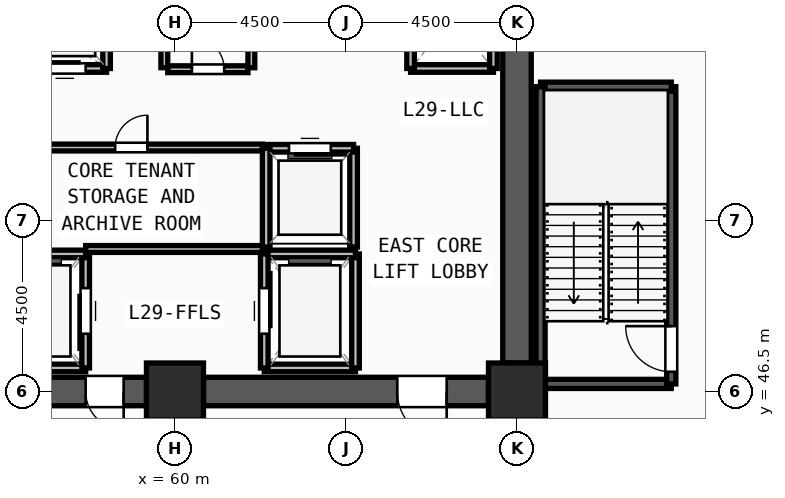
"""IFC4 building model, lengths in metres.
Left out: names, types, materials, properties, quantities, classifications, styles, units other than length and angle.
Written with IfcOpenShell. Run it as: python <this file> out.ifc"""

import sys

from ifc_helpers import new_model, si_unit, direction, frame, frame_2d, origin, origin_2d, place, context, subcontext, project, spatial, rectangle, extrude, source, transform, mapped, element, fill, save


model = new_model("IFC4")
c1 = context("Model", 3, precision=1e-05, world=origin(), true_north=direction((0.0, 1.0)))
c2 = subcontext(c1, "Body", "Model", "MODEL_VIEW")
j1 = project(units=[si_unit("LENGTHUNIT", "METRE"), si_unit("PLANEANGLEUNIT", "RADIAN")], contexts=[c1])
p1 = place(None, origin())
s1 = spatial("IfcSite", under=j1, at=p1, CompositionType="ELEMENT")
p2 = place(p1, origin())
s2 = spatial("IfcBuilding", under=s1, at=p2, CompositionType="ELEMENT")
p3 = place(p2, frame((0.0, 0.0, 113.25)))
s3 = spatial("IfcBuildingStorey", under=s2, at=p3, CompositionType="ELEMENT", Elevation=113.25)
m1 = source(origin(), c2, "Body", "SweptSolid", [
    extrude(rectangle(XDim=1.5, YDim=1.5, at=origin_2d()), origin(), (0.0, 0.0, 1.0), 3.75),
])
for number, where, z_axis, x_axis in (
    (1, (60.0, 46.5, 0.0), (0.0, 0.0, 1.0), (1.0, 0.0, 0.0)),
    (2, (69.0, 46.5, 0.0), (0.0, 0.0, 1.0), (1.0, 0.0, 0.0)),
):
    element("IfcColumn", number, at=place(p3, frame(where, z_axis=z_axis, x_axis=x_axis)), inside=s3, PredefinedType="COLUMN", context=c2, shape_type="MappedRepresentation", body=[
        mapped(m1, transform((0.0, 0.0, 0.0), x_axis=(1.0, 0.0, 0.0), y_axis=(0.0, 1.0, 0.0), z_axis=(0.0, 0.0, 1.0), scale=1.0)),
    ])
p4 = place(p3, frame((69.0, 60.75, 0.0), z_axis=(0.0, 0.0, 1.0), x_axis=(0.0, -1.0, 0.0)))
e3 = element("IfcWall", 3, at=p4, inside=s3, PredefinedType="SHEAR", context=c2, shape_type="SweptSolid", body=[
    extrude(rectangle(XDim=13.5, YDim=0.75, at=frame_2d((6.75, 0.0))), origin(), (0.0, 0.0, 1.0), 3.57),
])
m2 = source(origin(), c2, "Body", "SweptSolid", [
    extrude(rectangle(XDim=1.2, YDim=2.2, at=frame_2d((0.6, 1.1))), frame((0.0, 0.385, 0.0), z_axis=(0.0, -1.0, 0.0), x_axis=(1.0, 0.0, 0.0)), (0.0, 0.0, 1.0), 0.77),
])
p5 = place(p4, frame((1.2, 0.0, 0.0)))
e4 = element("IfcOpeningElement", 4, at=p5, cuts=e3, PredefinedType="OPENING", context=c2, shape_type="MappedRepresentation", body=[
    mapped(m2, transform((0.0, 0.0, 0.0), x_axis=(1.0, 0.0, 0.0), y_axis=(0.0, 1.0, 0.0), z_axis=(0.0, 0.0, 1.0), scale=1.0)),
])
p6 = place(p3, frame((68.25, 46.5, 0.0), z_axis=(0.0, 0.0, 1.0), x_axis=(-1.0, 0.0, 0.0)))
e5 = element("IfcWall", 5, at=p6, inside=s3, PredefinedType="SHEAR", context=c2, shape_type="SweptSolid", body=[
    extrude(rectangle(XDim=7.5, YDim=0.75, at=frame_2d((3.75, 0.0))), origin(), (0.0, 0.0, 1.0), 3.57),
])
m3 = source(origin(), c2, "Body", "SweptSolid", [
    extrude(rectangle(XDim=1.3, YDim=2.2, at=frame_2d((0.65, 1.1))), frame((0.0, 0.385, 0.0), z_axis=(0.0, -1.0, 0.0), x_axis=(1.0, 0.0, 0.0)), (0.0, 0.0, 1.0), 0.77),
])
p7 = place(p6, frame((1.1, 0.0, 0.0)))
e6 = element("IfcOpeningElement", 6, at=p7, cuts=e5, PredefinedType="OPENING", context=c2, shape_type="MappedRepresentation", body=[
    mapped(m3, transform((0.0, 0.0, 0.0), x_axis=(1.0, 0.0, 0.0), y_axis=(0.0, 1.0, 0.0), z_axis=(0.0, 0.0, 1.0), scale=1.0)),
])
p8 = place(p3, frame((59.25, 46.5, 0.0), z_axis=(0.0, 0.0, 1.0), x_axis=(-1.0, 0.0, 0.0)))
e7 = element("IfcWall", 7, at=p8, inside=s3, PredefinedType="SHEAR", context=c2, shape_type="SweptSolid", body=[
    extrude(rectangle(XDim=7.5, YDim=0.75, at=frame_2d((3.75, 0.0))), origin(), (0.0, 0.0, 1.0), 3.57),
])
p9 = place(p8, frame((5.1, 0.0, 0.0)))
e8 = element("IfcOpeningElement", 8, at=p9, cuts=e7, PredefinedType="OPENING", context=c2, shape_type="MappedRepresentation", body=[
    mapped(m3, transform((0.0, 0.0, 0.0), x_axis=(1.0, 0.0, 0.0), y_axis=(0.0, 1.0, 0.0), z_axis=(0.0, 0.0, 1.0), scale=1.0)),
])
m4 = source(origin(), c2, "Body", "SweptSolid", [
    extrude(rectangle(XDim=1.0, YDim=2.2, at=frame_2d((0.5, 1.1))), frame((0.0, 0.385, 0.0), z_axis=(0.0, -1.0, 0.0), x_axis=(1.0, 0.0, 0.0)), (0.0, 0.0, 1.0), 0.77),
])
p10 = place(p8, frame((0.6, 0.0, 0.0)))
e9 = element("IfcOpeningElement", 9, at=p10, cuts=e7, PredefinedType="OPENING", context=c2, shape_type="MappedRepresentation", body=[
    mapped(m4, transform((0.0, 0.0, 0.0), x_axis=(1.0, 0.0, 0.0), y_axis=(0.0, 1.0, 0.0), z_axis=(0.0, 0.0, 1.0), scale=1.0)),
])
p11 = place(p3, frame((69.62, 46.7, 0.0), z_axis=(0.0, 0.0, 1.0), x_axis=(1.0, 0.0, 0.0)))
e10 = element("IfcWall", 10, at=p11, inside=s3, PredefinedType="SOLIDWALL", context=c2, shape_type="SweptSolid", body=[
    extrude(rectangle(XDim=3.44, YDim=0.24, at=frame_2d((1.72, 0.0))), origin(), (0.0, 0.0, 1.0), 3.57),
])
p12 = place(p3, frame((73.06, 46.7, 0.0), z_axis=(0.0, 0.0, 1.0), x_axis=(0.0, 1.0, 0.0)))
e11 = element("IfcWall", 11, at=p12, inside=s3, PredefinedType="SOLIDWALL", context=c2, shape_type="SweptSolid", body=[
    extrude(rectangle(XDim=7.82, YDim=0.24, at=frame_2d((3.91, 0.0))), origin(), (0.0, 0.0, 1.0), 3.57),
])
m5 = source(origin(), c2, "Body", "SweptSolid", [
    extrude(rectangle(XDim=1.2, YDim=2.2, at=frame_2d((0.6, 1.1))), frame((0.0, 0.13, 0.0), z_axis=(0.0, -1.0, 0.0), x_axis=(1.0, 0.0, 0.0)), (0.0, 0.0, 1.0), 0.26),
])
p13 = place(p12, frame((0.32, 0.0, 0.0)))
e12 = element("IfcOpeningElement", 12, at=p13, cuts=e11, PredefinedType="OPENING", context=c2, shape_type="MappedRepresentation", body=[
    mapped(m5, transform((0.0, 0.0, 0.0), x_axis=(1.0, 0.0, 0.0), y_axis=(0.0, 1.0, 0.0), z_axis=(0.0, 0.0, 1.0), scale=1.0)),
])
p14 = place(p3, frame((73.06, 54.52, 0.0), z_axis=(0.0, 0.0, 1.0), x_axis=(-1.0, 0.0, 0.0)))
e13 = element("IfcWall", 13, at=p14, inside=s3, PredefinedType="SOLIDWALL", context=c2, shape_type="SweptSolid", body=[
    extrude(rectangle(XDim=3.44, YDim=0.24, at=frame_2d((1.72, 0.0))), origin(), (0.0, 0.0, 1.0), 3.57),
])
p15 = place(p3, frame((69.62, 54.52, 0.0), z_axis=(0.0, 0.0, 1.0), x_axis=(0.0, -1.0, 0.0)))
e14 = element("IfcWall", 14, at=p15, inside=s3, PredefinedType="SOLIDWALL", context=c2, shape_type="SweptSolid", body=[
    extrude(rectangle(XDim=7.82, YDim=0.24, at=frame_2d((3.91, 0.0))), origin(), (0.0, 0.0, 1.0), 3.57),
])
p16 = place(p3, frame((55.25, 47.12, 0.0), z_axis=(0.0, 0.0, 1.0), x_axis=(1.0, 0.0, 0.0)))
e15 = element("IfcWall", 15, at=p16, inside=s3, PredefinedType="SOLIDWALL", context=c2, shape_type="SweptSolid", body=[
    extrude(rectangle(XDim=2.4, YDim=0.2, at=frame_2d((1.2, 0.0))), origin(), (0.0, 0.0, 1.0), 3.57),
])
p17 = place(p3, frame((57.65, 47.12, 0.0), z_axis=(0.0, 0.0, 1.0), x_axis=(0.0, 1.0, 0.0)))
e16 = element("IfcWall", 16, at=p17, inside=s3, PredefinedType="SOLIDWALL", context=c2, shape_type="SweptSolid", body=[
    extrude(rectangle(XDim=3.0, YDim=0.2, at=frame_2d((1.5, 0.0))), origin(), (0.0, 0.0, 1.0), 3.57),
])
m6 = source(origin(), c2, "Body", "SweptSolid", [
    extrude(rectangle(XDim=1.2, YDim=2.3, at=frame_2d((0.6, 1.15))), frame((0.0, 0.11, 0.0), z_axis=(0.0, -1.0, 0.0), x_axis=(1.0, 0.0, 0.0)), (0.0, 0.0, 1.0), 0.22),
])
p18 = place(p17, frame((0.9, 0.0, 0.0)))
e17 = element("IfcOpeningElement", 17, at=p18, cuts=e16, PredefinedType="OPENING", context=c2, shape_type="MappedRepresentation", body=[
    mapped(m6, transform((0.0, 0.0, 0.0), x_axis=(1.0, 0.0, 0.0), y_axis=(0.0, 1.0, 0.0), z_axis=(0.0, 0.0, 1.0), scale=1.0)),
])
for number, where, z_axis, x_axis in (
    (18, (57.65, 50.12, 0.0), (0.0, 0.0, 1.0), (-1.0, 0.0, 0.0)),
    (19, (62.35, 47.12, 0.0), (0.0, 0.0, 1.0), (1.0, 0.0, 0.0)),
):
    element("IfcWall", number, at=place(p3, frame(where, z_axis=z_axis, x_axis=x_axis)), inside=s3, PredefinedType="SOLIDWALL", context=c2, shape_type="SweptSolid", body=[
        extrude(rectangle(XDim=2.4, YDim=0.2, at=frame_2d((1.2, 0.0))), origin(), (0.0, 0.0, 1.0), 3.57),
    ])
p19 = place(p3, frame((64.75, 47.12, 0.0), z_axis=(0.0, 0.0, 1.0), x_axis=(0.0, 1.0, 0.0)))
e20 = element("IfcWall", 20, at=p19, inside=s3, PredefinedType="SOLIDWALL", context=c2, shape_type="SweptSolid", body=[
    extrude(rectangle(XDim=3.0, YDim=0.2, at=frame_2d((1.5, 0.0))), origin(), (0.0, 0.0, 1.0), 3.57),
])
p20 = place(p3, frame((64.75, 50.12, 0.0), z_axis=(0.0, 0.0, 1.0), x_axis=(-1.0, 0.0, 0.0)))
e21 = element("IfcWall", 21, at=p20, inside=s3, PredefinedType="SOLIDWALL", context=c2, shape_type="SweptSolid", body=[
    extrude(rectangle(XDim=2.4, YDim=0.2, at=frame_2d((1.2, 0.0))), origin(), (0.0, 0.0, 1.0), 3.57),
])
p21 = place(p3, frame((62.35, 50.12, 0.0), z_axis=(0.0, 0.0, 1.0), x_axis=(0.0, -1.0, 0.0)))
e22 = element("IfcWall", 22, at=p21, inside=s3, PredefinedType="SOLIDWALL", context=c2, shape_type="SweptSolid", body=[
    extrude(rectangle(XDim=3.0, YDim=0.2, at=frame_2d((1.5, 0.0))), origin(), (0.0, 0.0, 1.0), 3.57),
])
p22 = place(p21, frame((0.9, 0.0, 0.0)))
e23 = element("IfcOpeningElement", 23, at=p22, cuts=e22, PredefinedType="OPENING", context=c2, shape_type="MappedRepresentation", body=[
    mapped(m6, transform((0.0, 0.0, 0.0), x_axis=(1.0, 0.0, 0.0), y_axis=(0.0, 1.0, 0.0), z_axis=(0.0, 0.0, 1.0), scale=1.0)),
])
p23 = place(p3, frame((66.2, 55.0, 0.0), z_axis=(0.0, 0.0, 1.0), x_axis=(1.0, 0.0, 0.0)))
e24 = element("IfcWall", 24, at=p23, inside=s3, PredefinedType="SOLIDWALL", context=c2, shape_type="SweptSolid", body=[
    extrude(rectangle(XDim=2.18, YDim=0.2, at=frame_2d((1.09, 0.0))), origin(), (0.0, 0.0, 1.0), 3.57),
])
for number, where, z_axis, x_axis in (
    (25, (68.38, 55.0, 0.0), (0.0, 0.0, 1.0), (0.0, 1.0, 0.0)),
    (26, (66.2, 57.75, 0.0), (0.0, 0.0, 1.0), (0.0, -1.0, 0.0)),
):
    element("IfcWall", number, at=place(p3, frame(where, z_axis=z_axis, x_axis=x_axis)), inside=s3, PredefinedType="SOLIDWALL", context=c2, shape_type="SweptSolid", body=[
        extrude(rectangle(XDim=2.75, YDim=0.2, at=frame_2d((1.375, 0.0))), origin(), (0.0, 0.0, 1.0), 3.57),
    ])
p24 = place(p3, frame((64.7, 50.3, 0.0), z_axis=(0.0, 0.0, 1.0), x_axis=(0.0, 1.0, 0.0)))
e27 = element("IfcWall", 27, at=p24, inside=s3, PredefinedType="SOLIDWALL", context=c2, shape_type="SweptSolid", body=[
    extrude(rectangle(XDim=2.6, YDim=0.2, at=frame_2d((1.3, 0.0))), origin(), (0.0, 0.0, 1.0), 3.57),
])
p25 = place(p3, frame((64.7, 52.9, 0.0), z_axis=(0.0, 0.0, 1.0), x_axis=(-1.0, 0.0, 0.0)))
e28 = element("IfcWall", 28, at=p25, inside=s3, PredefinedType="SOLIDWALL", context=c2, shape_type="SweptSolid", body=[
    extrude(rectangle(XDim=2.3, YDim=0.2, at=frame_2d((1.15, 0.0))), origin(), (0.0, 0.0, 1.0), 3.57),
])
m7 = source(origin(), c2, "Body", "SweptSolid", [
    extrude(rectangle(XDim=1.1, YDim=2.2, at=frame_2d((0.55, 1.1))), frame((0.0, 0.11, 0.0), z_axis=(0.0, -1.0, 0.0), x_axis=(1.0, 0.0, 0.0)), (0.0, 0.0, 1.0), 0.22),
])
p26 = place(p25, frame((0.6, 0.0, 0.0)))
e29 = element("IfcOpeningElement", 29, at=p26, cuts=e28, PredefinedType="OPENING", context=c2, shape_type="MappedRepresentation", body=[
    mapped(m7, transform((0.0, 0.0, 0.0), x_axis=(1.0, 0.0, 0.0), y_axis=(0.0, 1.0, 0.0), z_axis=(0.0, 0.0, 1.0), scale=1.0)),
])
p27 = place(p3, frame((62.4, 52.9, 0.0), z_axis=(0.0, 0.0, 1.0), x_axis=(0.0, -1.0, 0.0)))
e30 = element("IfcWall", 30, at=p27, inside=s3, PredefinedType="SOLIDWALL", context=c2, shape_type="SweptSolid", body=[
    extrude(rectangle(XDim=2.6, YDim=0.2, at=frame_2d((1.3, 0.0))), origin(), (0.0, 0.0, 1.0), 3.57),
])
p28 = place(p3, frame((56.0, 55.0, 0.0), z_axis=(0.0, 0.0, 1.0), x_axis=(1.0, 0.0, 0.0)))
e31 = element("IfcWall", 31, at=p28, inside=s3, PredefinedType="SOLIDWALL", context=c2, shape_type="SweptSolid", body=[
    extrude(rectangle(XDim=2.2, YDim=0.2, at=frame_2d((1.1, 0.0))), origin(), (0.0, 0.0, 1.0), 3.57),
])
p29 = place(p28, frame((0.55, 0.0, 0.0)))
e32 = element("IfcOpeningElement", 32, at=p29, cuts=e31, PredefinedType="OPENING", context=c2, shape_type="MappedRepresentation", body=[
    mapped(m7, transform((0.0, 0.0, 0.0), x_axis=(1.0, 0.0, 0.0), y_axis=(0.0, 1.0, 0.0), z_axis=(0.0, 0.0, 1.0), scale=1.0)),
])
p30 = place(p3, frame((58.2, 55.0, 0.0), z_axis=(0.0, 0.0, 1.0), x_axis=(0.0, 1.0, 0.0)))
e33 = element("IfcWall", 33, at=p30, inside=s3, PredefinedType="SOLIDWALL", context=c2, shape_type="SweptSolid", body=[
    extrude(rectangle(XDim=2.6, YDim=0.2, at=frame_2d((1.3, 0.0))), origin(), (0.0, 0.0, 1.0), 3.57),
])
p31 = place(p3, frame((55.39, 52.92, 0.0), z_axis=(0.0, 0.0, 1.0), x_axis=(1.0, 0.0, 0.0)))
e34 = element("IfcWall", 34, at=p31, inside=s3, PredefinedType="PARTITIONING", context=c2, shape_type="SweptSolid", body=[
    extrude(rectangle(XDim=6.91, YDim=0.18, at=frame_2d((3.455, 0.0))), origin(), (0.0, 0.0, 1.0), 3.57),
])
m8 = source(origin(), c2, "Body", "SweptSolid", [
    extrude(rectangle(XDim=0.85, YDim=2.1, at=frame_2d((0.425, 1.05))), frame((0.0, 0.1, 0.0), z_axis=(0.0, -1.0, 0.0), x_axis=(1.0, 0.0, 0.0)), (0.0, 0.0, 1.0), 0.2),
])
p32 = place(p31, frame((3.035, 0.0, 0.0)))
e35 = element("IfcOpeningElement", 35, at=p32, cuts=e34, PredefinedType="OPENING", context=c2, shape_type="MappedRepresentation", body=[
    mapped(m8, transform((0.0, 0.0, 0.0), x_axis=(1.0, 0.0, 0.0), y_axis=(0.0, 1.0, 0.0), z_axis=(0.0, 0.0, 1.0), scale=1.0)),
])
p33 = place(p3, frame((59.81, 54.98, 0.0), z_axis=(0.0, 0.0, 1.0), x_axis=(1.0, 0.0, 0.0)))
e36 = element("IfcWall", 36, at=p33, inside=s3, PredefinedType="PARTITIONING", context=c2, shape_type="SweptSolid", body=[
    extrude(rectangle(XDim=2.11, YDim=0.18, at=frame_2d((1.055, 0.0))), origin(), (0.0, 0.0, 1.0), 3.57),
])
p34 = place(p33, frame((0.635, 0.0, 0.0)))
e37 = element("IfcOpeningElement", 37, at=p34, cuts=e36, PredefinedType="OPENING", context=c2, shape_type="MappedRepresentation", body=[
    mapped(m8, transform((0.0, 0.0, 0.0), x_axis=(1.0, 0.0, 0.0), y_axis=(0.0, 1.0, 0.0), z_axis=(0.0, 0.0, 1.0), scale=1.0)),
])
for number, where, z_axis, x_axis in (
    (38, (59.72, 55.02, 0.0), (0.0, 0.0, 1.0), (0.0, 1.0, 0.0)),
    (39, (62.01, 55.02, 0.0), (0.0, 0.0, 1.0), (0.0, 1.0, 0.0)),
):
    element("IfcWall", number, at=place(p3, frame(where, z_axis=z_axis, x_axis=x_axis)), inside=s3, PredefinedType="PARTITIONING", context=c2, shape_type="SweptSolid", body=[
        extrude(rectangle(XDim=2.88, YDim=0.18, at=frame_2d((1.44, 0.0))), origin(), (0.0, 0.0, 1.0), 3.57),
    ])
p35 = place(p3, frame((57.65, 50.25, 0.0), z_axis=(0.0, 0.0, 1.0), x_axis=(1.0, 0.0, 0.0)))
e40 = element("IfcWall", 40, at=p35, inside=s3, PredefinedType="PARTITIONING", context=c2, shape_type="SweptSolid", body=[
    extrude(rectangle(XDim=4.65, YDim=0.18, at=frame_2d((2.325, 0.0))), origin(), (0.0, 0.0, 1.0), 3.57),
])
m9 = source(origin(), c2, "Body", "SweptSolid", [
    extrude(rectangle(XDim=1.0, YDim=2.2, at=frame_2d((0.5, 1.1))), frame((0.0, 0.025, 0.0), z_axis=(0.0, -1.0, 0.0), x_axis=(1.0, 0.0, 0.0)), (0.0, 0.0, 1.0), 0.05),
])
p36 = place(p10, origin())
e41 = element("IfcDoor", 41, at=p36, inside=s3, OperationType="SINGLE_SWING_LEFT", PredefinedType="DOOR", context=c2, shape_type="MappedRepresentation", body=[
    mapped(m9, transform((0.0, 0.0, 0.0), x_axis=(1.0, 0.0, 0.0), y_axis=(0.0, 1.0, 0.0), z_axis=(0.0, 0.0, 1.0), scale=1.0)),
])
fill(e9, e41)
m10 = source(origin(), c2, "Body", "SweptSolid", [
    extrude(rectangle(XDim=1.3, YDim=2.2, at=frame_2d((0.65, 1.1))), frame((0.0, 0.025, 0.0), z_axis=(0.0, -1.0, 0.0), x_axis=(1.0, 0.0, 0.0)), (0.0, 0.0, 1.0), 0.05),
])
p37 = place(p7, origin())
e42 = element("IfcDoor", 42, at=p37, inside=s3, OperationType="SINGLE_SWING_LEFT", PredefinedType="DOOR", context=c2, shape_type="MappedRepresentation", body=[
    mapped(m10, transform((0.0, 0.0, 0.0), x_axis=(1.0, 0.0, 0.0), y_axis=(0.0, 1.0, 0.0), z_axis=(0.0, 0.0, 1.0), scale=1.0)),
])
fill(e6, e42)
m11 = source(origin(), c2, "Body", "SweptSolid", [
    extrude(rectangle(XDim=1.2, YDim=2.2, at=frame_2d((0.6, 1.1))), frame((0.0, 0.025, 0.0), z_axis=(0.0, -1.0, 0.0), x_axis=(1.0, 0.0, 0.0)), (0.0, 0.0, 1.0), 0.05),
])
p38 = place(p13, origin())
e43 = element("IfcDoor", 43, at=p38, inside=s3, OperationType="SINGLE_SWING_RIGHT", PredefinedType="DOOR", context=c2, shape_type="MappedRepresentation", body=[
    mapped(m11, transform((0.0, 0.0, 0.0), x_axis=(1.0, 0.0, 0.0), y_axis=(0.0, 1.0, 0.0), z_axis=(0.0, 0.0, 1.0), scale=1.0)),
])
fill(e12, e43)
m12 = source(origin(), c2, "Body", "SweptSolid", [
    extrude(rectangle(XDim=1.2, YDim=2.3, at=frame_2d((0.6, 1.15))), frame((0.0, 0.025, 0.0), z_axis=(0.0, -1.0, 0.0), x_axis=(1.0, 0.0, 0.0)), (0.0, 0.0, 1.0), 0.05),
])
p39 = place(p18, origin())
e44 = element("IfcDoor", 44, at=p39, inside=s3, OperationType="SLIDING_TO_LEFT", PredefinedType="DOOR", context=c2, shape_type="MappedRepresentation", body=[
    mapped(m12, transform((0.0, 0.0, 0.0), x_axis=(1.0, 0.0, 0.0), y_axis=(0.0, 1.0, 0.0), z_axis=(0.0, 0.0, 1.0), scale=1.0)),
])
fill(e17, e44)
p40 = place(p22, origin())
e45 = element("IfcDoor", 45, at=p40, inside=s3, OperationType="SLIDING_TO_LEFT", PredefinedType="DOOR", context=c2, shape_type="MappedRepresentation", body=[
    mapped(m12, transform((0.0, 0.0, 0.0), x_axis=(1.0, 0.0, 0.0), y_axis=(0.0, 1.0, 0.0), z_axis=(0.0, 0.0, 1.0), scale=1.0)),
])
fill(e23, e45)
m13 = source(origin(), c2, "Body", "SweptSolid", [
    extrude(rectangle(XDim=1.1, YDim=2.2, at=frame_2d((0.55, 1.1))), frame((0.0, 0.025, 0.0), z_axis=(0.0, -1.0, 0.0), x_axis=(1.0, 0.0, 0.0)), (0.0, 0.0, 1.0), 0.05),
])
p41 = place(p26, origin())
e46 = element("IfcDoor", 46, at=p41, inside=s3, OperationType="SLIDING_TO_LEFT", PredefinedType="DOOR", context=c2, shape_type="MappedRepresentation", body=[
    mapped(m13, transform((0.0, 0.0, 0.0), x_axis=(1.0, 0.0, 0.0), y_axis=(0.0, 1.0, 0.0), z_axis=(0.0, 0.0, 1.0), scale=1.0)),
])
fill(e29, e46)
p42 = place(p29, origin())
e47 = element("IfcDoor", 47, at=p42, inside=s3, OperationType="SLIDING_TO_LEFT", PredefinedType="DOOR", context=c2, shape_type="MappedRepresentation", body=[
    mapped(m13, transform((0.0, 0.0, 0.0), x_axis=(1.0, 0.0, 0.0), y_axis=(0.0, 1.0, 0.0), z_axis=(0.0, 0.0, 1.0), scale=1.0)),
])
fill(e32, e47)
m14 = source(origin(), c2, "Body", "SweptSolid", [
    extrude(rectangle(XDim=0.85, YDim=2.1, at=frame_2d((0.425, 1.05))), frame((0.0, 0.025, 0.0), z_axis=(0.0, -1.0, 0.0), x_axis=(1.0, 0.0, 0.0)), (0.0, 0.0, 1.0), 0.05),
])
p43 = place(p32, origin())
e48 = element("IfcDoor", 48, at=p43, inside=s3, OperationType="SINGLE_SWING_RIGHT", PredefinedType="DOOR", context=c2, shape_type="MappedRepresentation", body=[
    mapped(m14, transform((0.0, 0.0, 0.0), x_axis=(1.0, 0.0, 0.0), y_axis=(0.0, 1.0, 0.0), z_axis=(0.0, 0.0, 1.0), scale=1.0)),
])
fill(e35, e48)
p44 = place(p34, origin())
e49 = element("IfcDoor", 49, at=p44, inside=s3, OperationType="SINGLE_SWING_LEFT", PredefinedType="DOOR", context=c2, shape_type="MappedRepresentation", body=[
    mapped(m14, transform((0.0, 0.0, 0.0), x_axis=(1.0, 0.0, 0.0), y_axis=(0.0, 1.0, 0.0), z_axis=(0.0, 0.0, 1.0), scale=1.0)),
])
fill(e37, e49)
save(model, sys.argv[1])
